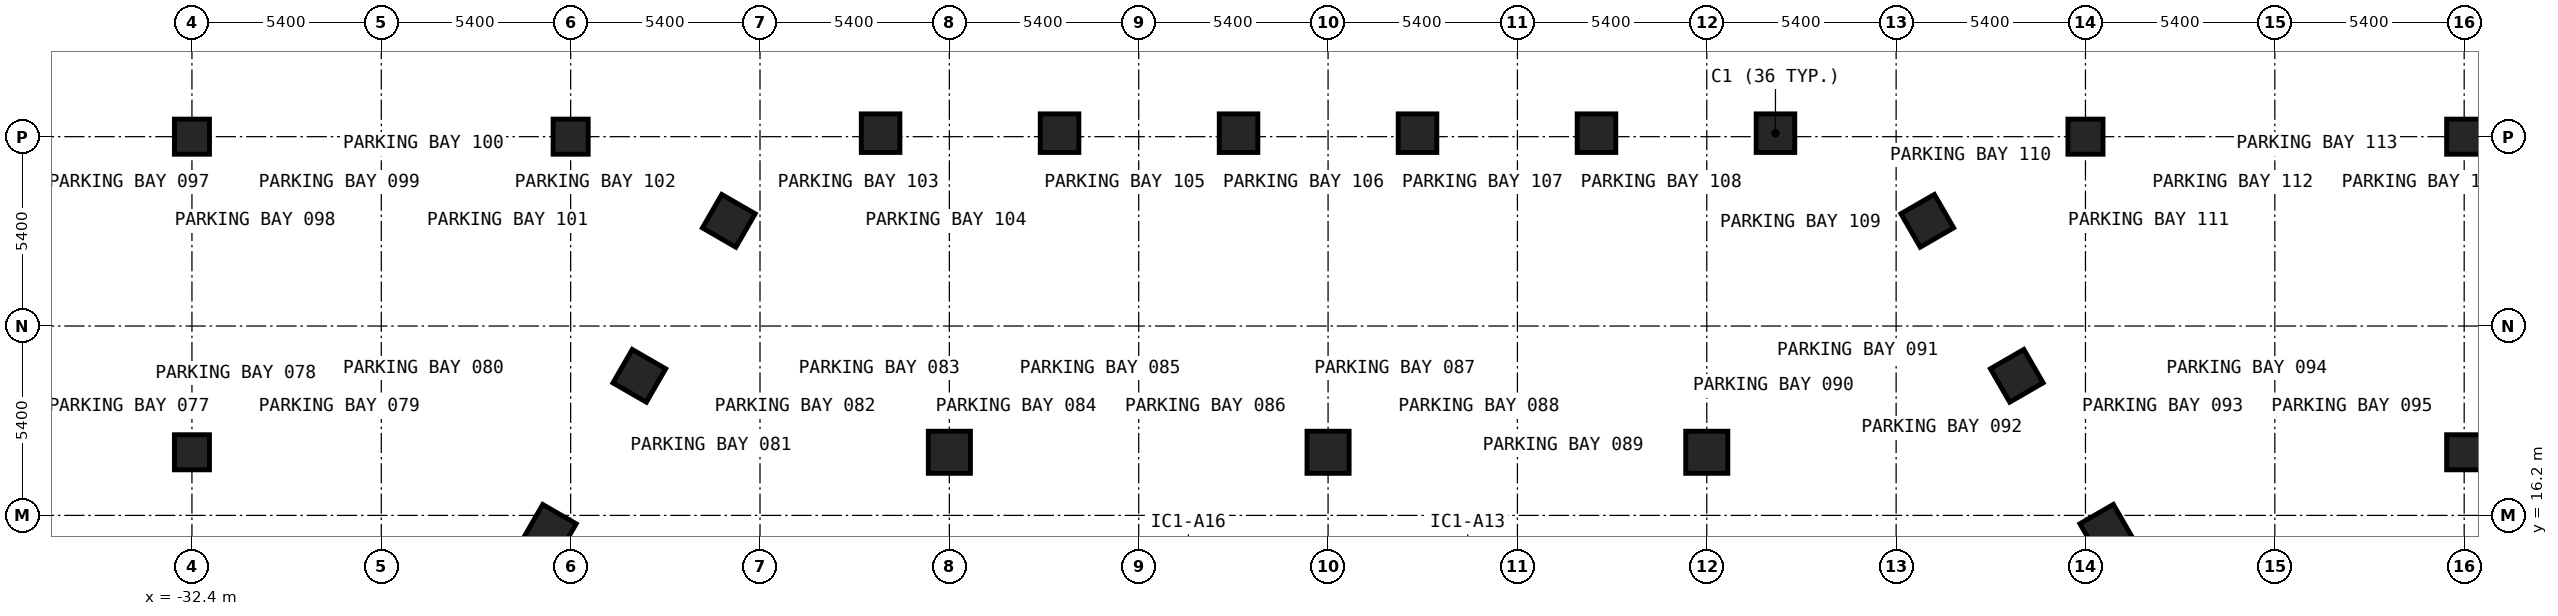
"""IFC4 building model, lengths in metres.
Left out: names, types, materials, properties, quantities, classifications, styles, units other than length and angle.
Written with IfcOpenShell. Run it as: python <this file> out.ifc"""

import sys

from ifc_helpers import new_model, si_unit, direction, frame, origin, origin_2d, place, context, subcontext, project, spatial, rectangle, extrude, element, save


model = new_model("IFC4")
c1 = context("Model", 3, precision=1e-05, world=origin(), true_north=direction((0.0, 1.0)))
c2 = subcontext(c1, "Body", "Model", "MODEL_VIEW")
j1 = project(units=[si_unit("LENGTHUNIT", "METRE"), si_unit("PLANEANGLEUNIT", "RADIAN")], contexts=[c1])
p1 = place(None, origin())
s1 = spatial("IfcSite", under=j1, at=p1, CompositionType="ELEMENT")
p2 = place(p1, origin())
s2 = spatial("IfcBuilding", under=s1, at=p2, CompositionType="ELEMENT")
p3 = place(p2, frame((0.0, 0.0, -8.4)))
s3 = spatial("IfcBuildingStorey", under=s2, at=p3, CompositionType="ELEMENT", Elevation=-8.4)
for number, where, z_axis, x_axis in (
    (1, (12.759, 27.1, -0.35), (0.0, 0.0, 1.0), (-1.0, 0.0, 0.0)),
    (2, (7.655, 27.1, -0.35), (0.0, 0.0, 1.0), (-1.0, 0.0, 0.0)),
    (3, (2.551, 27.1, -0.35), (0.0, 0.0, 1.0), (-1.0, 0.0, 0.0)),
    (4, (-2.553, 27.1, -0.35), (0.0, 0.0, 1.0), (-1.0, 0.0, 0.0)),
    (5, (-7.657, 27.1, -0.35), (0.0, 0.0, 1.0), (-1.0, 0.0, 0.0)),
    (6, (-12.761, 27.1, -0.35), (0.0, 0.0, 1.0), (-1.0, 0.0, 0.0)),
    (7, (-17.09, 24.6, -0.35), (0.0, 0.0, 1.0), (-0.5, -0.866, 0.0)),
    (8, (-19.642, 20.18, -0.35), (0.0, 0.0, 1.0), (-0.5, -0.866, 0.0)),
    (9, (-22.194, 15.759, -0.35), (0.0, 0.0, 1.0), (-0.5, -0.866, 0.0)),
    (10, (22.193, 15.761, -0.35), (0.0, 0.0, 1.0), (-0.5, 0.866, 0.0)),
    (11, (19.641, 20.181, -0.35), (0.0, 0.0, 1.0), (-0.5, 0.866, 0.0)),
    (12, (17.089, 24.601, -0.35), (0.0, 0.0, 1.0), (-0.5, 0.866, 0.0)),
):
    element("IfcColumn", number, at=place(p3, frame(where, z_axis=z_axis, x_axis=x_axis)), inside=s3, PredefinedType="COLUMN", context=c2, shape_type="SweptSolid", body=[
        extrude(rectangle(XDim=1.1, YDim=1.1, at=origin_2d()), origin(), (0.0, 0.0, 1.0), 4.55),
    ])
for number, where, z_axis, x_axis in (
    (13, (-10.8, 18.0, -0.35), (0.0, 0.0, 1.0), (1.0, 0.0, 0.0)),
    (14, (0.0, 18.0, -0.35), (0.0, 0.0, 1.0), (1.0, 0.0, 0.0)),
    (15, (10.8, 18.0, -0.35), (0.0, 0.0, 1.0), (1.0, 0.0, 0.0)),
):
    element("IfcColumn", number, at=place(p3, frame(where, z_axis=z_axis, x_axis=x_axis)), inside=s3, PredefinedType="COLUMN", context=c2, shape_type="SweptSolid", body=[
        extrude(rectangle(XDim=1.2, YDim=1.2, at=origin_2d()), origin(), (0.0, 0.0, 1.0), 4.55),
    ])
for number, where, z_axis, x_axis in (
    (16, (-32.4, 18.0, -0.35), (0.0, 0.0, 1.0), (1.0, 0.0, 0.0)),
    (17, (-32.4, 27.0, -0.35), (0.0, 0.0, 1.0), (1.0, 0.0, 0.0)),
    (18, (-21.6, 27.0, -0.35), (0.0, 0.0, 1.0), (1.0, 0.0, 0.0)),
    (19, (21.6, 27.0, -0.35), (0.0, 0.0, 1.0), (1.0, 0.0, 0.0)),
    (20, (32.4, 18.0, -0.35), (0.0, 0.0, 1.0), (1.0, 0.0, 0.0)),
    (21, (32.4, 27.0, -0.35), (0.0, 0.0, 1.0), (1.0, 0.0, 0.0)),
):
    element("IfcColumn", number, at=place(p3, frame(where, z_axis=z_axis, x_axis=x_axis)), inside=s3, PredefinedType="COLUMN", context=c2, shape_type="SweptSolid", body=[
        extrude(rectangle(XDim=1.0, YDim=1.0, at=origin_2d()), origin(), (0.0, 0.0, 1.0), 4.55),
    ])
save(model, sys.argv[1])
